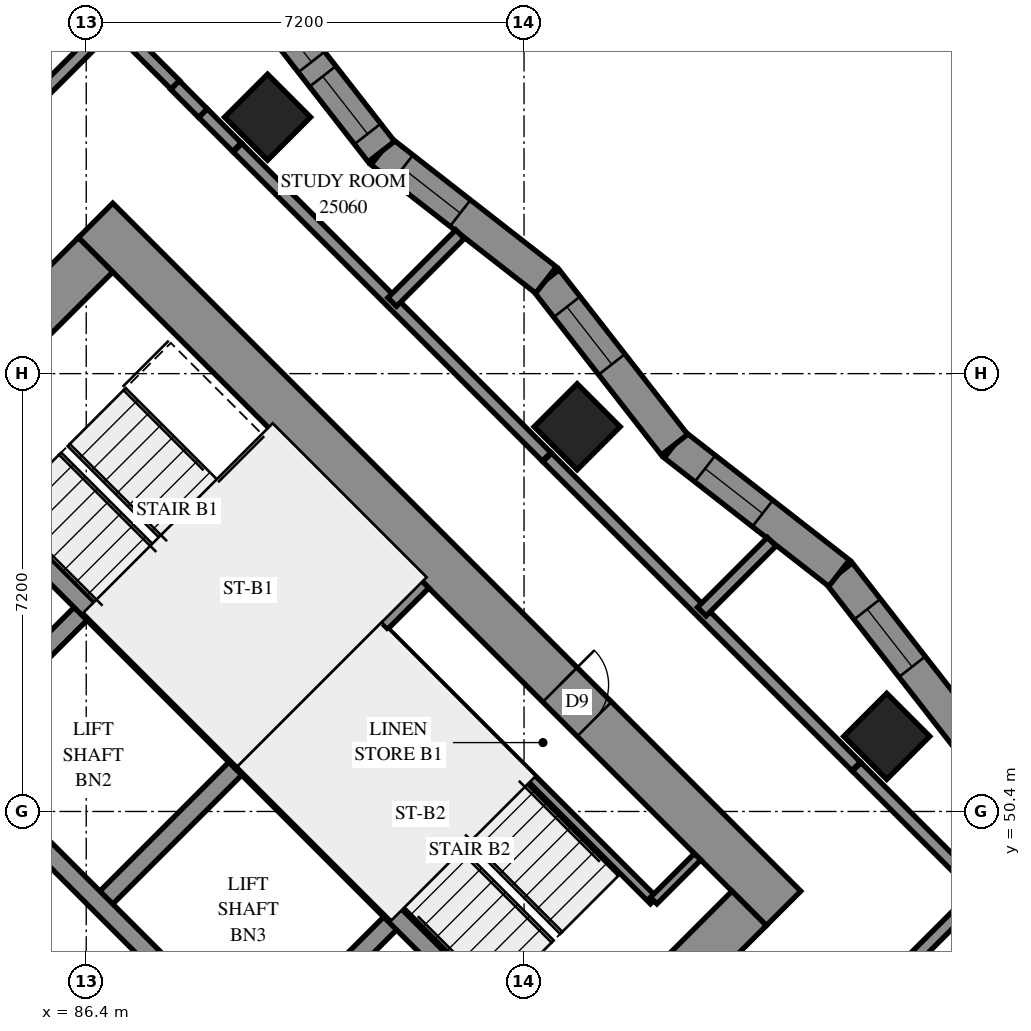
"""IFC4 building model, lengths in metres.
Left out: names, types, materials, properties, quantities, classifications, styles, units other than length and angle.
Written with IfcOpenShell. Run it as: python <this file> out.ifc"""

import sys

from ifc_helpers import new_model, si_unit, direction, frame, frame_2d, origin, origin_2d, place, context, subcontext, project, spatial, polyline, rectangle, outline, extrude, element, fill, save


model = new_model("IFC4")
c1 = context("Model", 3, precision=1e-05, world=origin(), true_north=direction((0.0, 1.0)))
c2 = subcontext(c1, "Body", "Model", "MODEL_VIEW")
j1 = project(units=[si_unit("LENGTHUNIT", "METRE"), si_unit("PLANEANGLEUNIT", "RADIAN")], contexts=[c1])
p1 = place(None, origin())
s1 = spatial("IfcSite", under=j1, at=p1, CompositionType="ELEMENT")
p2 = place(p1, origin())
s2 = spatial("IfcBuilding", under=s1, at=p2, CompositionType="ELEMENT")
p3 = place(p2, frame((0.0, 0.0, 94.8)))
s3 = spatial("IfcBuildingStorey", under=s2, at=p3, CompositionType="ELEMENT", Elevation=94.8)
for number, where, z_axis, x_axis in (
    (1, (89.382, 61.818, 0.0), (0.0, 0.0, 1.0), (0.707, -0.707, 0.0)),
    (2, (94.474, 56.727, 0.0), (0.0, 0.0, 1.0), (0.707, -0.707, 0.0)),
    (3, (99.565, 51.635, 0.0), (0.0, 0.0, 1.0), (0.707, -0.707, 0.0)),
):
    element("IfcColumn", number, at=place(p3, frame(where, z_axis=z_axis, x_axis=x_axis)), inside=s3, PredefinedType="COLUMN", context=c2, shape_type="SweptSolid", body=[
        extrude(rectangle(XDim=1.0, YDim=1.0, at=origin_2d()), origin(), (0.0, 0.0, 1.0), 3.1),
    ])
p4 = place(p3, frame((75.806, 49.373, -0.3), z_axis=(0.0, 0.0, 1.0), x_axis=(0.7071067812, -0.7071067812, 0.0)))
e4 = element("IfcWall", 4, at=p4, inside=s3, PredefinedType="SHEAR", context=c2, shape_type="SweptSolid", body=[
    extrude(rectangle(XDim=16.0, YDim=0.8, at=frame_2d((8.0, 0.0))), origin(), (0.0, 0.0, 1.0), 2.7),
])
p5 = place(p3, frame((86.554, 60.121, -0.3), z_axis=(0.0, 0.0, 1.0), x_axis=(0.7071067812, -0.7071067812, 0.0)))
e5 = element("IfcWall", 5, at=p5, inside=s3, PredefinedType="SHEAR", context=c2, shape_type="SweptSolid", body=[
    extrude(rectangle(XDim=16.0, YDim=0.8, at=frame_2d((8.0, 0.0))), origin(), (0.0, 0.0, 1.0), 2.7),
])
p6 = place(p5, frame((10.8, 0.0, 0.3)))
e6 = element("IfcOpeningElement", 6, at=p6, cuts=e5, PredefinedType="OPENING", context=c2, shape_type="SweptSolid", body=[
    extrude(rectangle(XDim=0.8, YDim=2.1, at=frame_2d((0.4, 1.05))), frame((0.0, 0.41, 0.0), z_axis=(0.0, -1.0, 0.0), x_axis=(1.0, 0.0, 0.0)), (0.0, 0.0, 1.0), 0.82),
])
p7 = place(p3, frame((76.372, 49.373, -0.3), z_axis=(0.0, 0.0, 1.0), x_axis=(0.7071067812, 0.7071067812, 0.0)))
e7 = element("IfcWall", 7, at=p7, inside=s3, PredefinedType="SHEAR", context=c2, shape_type="SweptSolid", body=[
    extrude(rectangle(XDim=14.4, YDim=0.8, at=frame_2d((7.2, 0.0))), origin(), (0.0, 0.0, 1.0), 2.7),
])
p8 = place(p7, frame((4.55, 0.0, 0.3)))
e8 = element("IfcOpeningElement", 8, at=p8, cuts=e7, PredefinedType="OPENING", context=c2, shape_type="SweptSolid", body=[
    extrude(rectangle(XDim=1.1, YDim=2.1, at=frame_2d((0.55, 1.05))), frame((0.0, 0.41, 0.0), z_axis=(0.0, -1.0, 0.0), x_axis=(1.0, 0.0, 0.0)), (0.0, 0.0, 1.0), 0.82),
])
p9 = place(p7, frame((11.35, 0.0, 0.3)))
e9 = element("IfcOpeningElement", 9, at=p9, cuts=e7, PredefinedType="OPENING", context=c2, shape_type="SweptSolid", body=[
    extrude(rectangle(XDim=1.1, YDim=2.1, at=frame_2d((0.55, 1.05))), frame((0.0, 0.41, 0.0), z_axis=(0.0, -1.0, 0.0), x_axis=(1.0, 0.0, 0.0)), (0.0, 0.0, 1.0), 0.82),
])
p10 = place(p3, frame((87.12, 38.625, -0.3), z_axis=(0.0, 0.0, 1.0), x_axis=(0.7071067812, 0.7071067812, 0.0)))
e10 = element("IfcWall", 10, at=p10, inside=s3, PredefinedType="SHEAR", context=c2, shape_type="SweptSolid", body=[
    extrude(rectangle(XDim=14.4, YDim=0.8, at=frame_2d((7.2, 0.0))), origin(), (0.0, 0.0, 1.0), 2.7),
])
p11 = place(p10, frame((4.55, 0.0, 0.3)))
e11 = element("IfcOpeningElement", 11, at=p11, cuts=e10, PredefinedType="OPENING", context=c2, shape_type="SweptSolid", body=[
    extrude(rectangle(XDim=1.1, YDim=2.1, at=frame_2d((0.55, 1.05))), frame((0.0, 0.41, 0.0), z_axis=(0.0, -1.0, 0.0), x_axis=(1.0, 0.0, 0.0)), (0.0, 0.0, 1.0), 0.82),
])
p12 = place(p10, frame((11.35, 0.0, 0.3)))
e12 = element("IfcOpeningElement", 12, at=p12, cuts=e10, PredefinedType="OPENING", context=c2, shape_type="SweptSolid", body=[
    extrude(rectangle(XDim=1.1, YDim=2.1, at=frame_2d((0.55, 1.05))), frame((0.0, 0.41, 0.0), z_axis=(0.0, -1.0, 0.0), x_axis=(1.0, 0.0, 0.0)), (0.0, 0.0, 1.0), 0.82),
])
p13 = place(p3, frame((84.079, 51.423, 0.0), z_axis=(0.0, 0.0, 1.0), x_axis=(0.7071219326, 0.7070916295, 0.0)))
e13 = element("IfcWall", 13, at=p13, inside=s3, PredefinedType="SOLIDWALL", context=c2, shape_type="SweptSolid", body=[
    extrude(rectangle(XDim=3.3, YDim=0.3, at=frame_2d((1.65, 0.0))), origin(), (0.0, 0.0, 1.0), 3.1),
])
for number, where, z_axis, x_axis in (
    (14, (86.625, 48.878, 0.0), (0.0, 0.0, 1.0), (0.707, 0.707, 0.0)),
    (15, (89.17, 46.332, 0.0), (0.0, 0.0, 1.0), (0.707, 0.707, 0.0)),
):
    element("IfcWall", number, at=place(p3, frame(where, z_axis=z_axis, x_axis=x_axis)), inside=s3, PredefinedType="SOLIDWALL", context=c2, shape_type="SweptSolid", body=[
        extrude(rectangle(XDim=3.3, YDim=0.3, at=frame_2d((1.65, 0.0))), origin(), (0.0, 0.0, 1.0), 3.1),
    ])
p14 = place(p3, frame((78.988, 51.423, 0.0), z_axis=(0.0, 0.0, 1.0), x_axis=(0.7071067812, -0.7071067812, 0.0)))
e16 = element("IfcWall", 16, at=p14, inside=s3, PredefinedType="SOLIDWALL", context=c2, shape_type="SweptSolid", body=[
    extrude(rectangle(XDim=14.4, YDim=0.3, at=frame_2d((7.2, 0.0))), origin(), (0.0, 0.0, 1.0), 3.1),
])
p15 = place(p14, frame((1.25, 0.0, 0.0)))
e17 = element("IfcOpeningElement", 17, at=p15, cuts=e16, PredefinedType="OPENING", context=c2, shape_type="SweptSolid", body=[
    extrude(rectangle(XDim=1.1, YDim=2.1, at=frame_2d((0.55, 1.05))), frame((0.0, 0.16, 0.0), z_axis=(0.0, -1.0, 0.0), x_axis=(1.0, 0.0, 0.0)), (0.0, 0.0, 1.0), 0.32),
])
p16 = place(p14, frame((4.85, 0.0, 0.0)))
e18 = element("IfcOpeningElement", 18, at=p16, cuts=e16, PredefinedType="OPENING", context=c2, shape_type="SweptSolid", body=[
    extrude(rectangle(XDim=1.1, YDim=2.1, at=frame_2d((0.55, 1.05))), frame((0.0, 0.16, 0.0), z_axis=(0.0, -1.0, 0.0), x_axis=(1.0, 0.0, 0.0)), (0.0, 0.0, 1.0), 0.32),
])
p17 = place(p14, frame((8.45, 0.0, 0.0)))
e19 = element("IfcOpeningElement", 19, at=p17, cuts=e16, PredefinedType="OPENING", context=c2, shape_type="SweptSolid", body=[
    extrude(rectangle(XDim=1.1, YDim=2.1, at=frame_2d((0.55, 1.05))), frame((0.0, 0.16, 0.0), z_axis=(0.0, -1.0, 0.0), x_axis=(1.0, 0.0, 0.0)), (0.0, 0.0, 1.0), 0.32),
])
p18 = place(p14, frame((12.05, 0.0, 0.0)))
e20 = element("IfcOpeningElement", 20, at=p18, cuts=e16, PredefinedType="OPENING", context=c2, shape_type="SweptSolid", body=[
    extrude(rectangle(XDim=1.1, YDim=2.1, at=frame_2d((0.55, 1.05))), frame((0.0, 0.16, 0.0), z_axis=(0.0, -1.0, 0.0), x_axis=(1.0, 0.0, 0.0)), (0.0, 0.0, 1.0), 0.32),
])
p19 = place(p3, frame((81.534, 53.969, 0.0), z_axis=(0.0, 0.0, 1.0), x_axis=(0.707103309, -0.7071102534, 0.0)))
e21 = element("IfcWall", 21, at=p19, inside=s3, PredefinedType="SOLIDWALL", context=c2, shape_type="SweptSolid", body=[
    extrude(rectangle(XDim=14.4, YDim=0.3, at=frame_2d((7.2, 0.0))), origin(), (0.0, 0.0, 1.0), 3.1),
])
p20 = place(p19, frame((12.05, 0.0, 0.0)))
e22 = element("IfcOpeningElement", 22, at=p20, cuts=e21, PredefinedType="OPENING", context=c2, shape_type="SweptSolid", body=[
    extrude(rectangle(XDim=1.1, YDim=2.1, at=frame_2d((0.55, 1.05))), frame((0.0, 0.16, 0.0), z_axis=(0.0, -1.0, 0.0), x_axis=(1.0, 0.0, 0.0)), (0.0, 0.0, 1.0), 0.32),
])
for number, where, z_axis, x_axis in (
    (23, (83.867, 56.302, 0.0), (0.0, 0.0, 1.0), (0.707, -0.707, 0.0)),
    (24, (88.958, 51.211, 0.0), (0.0, 0.0, 1.0), (0.707, -0.707, 0.0)),
):
    element("IfcWall", number, at=place(p3, frame(where, z_axis=z_axis, x_axis=x_axis)), inside=s3, PredefinedType="SOLIDWALL", context=c2, shape_type="SweptSolid", body=[
        extrude(rectangle(XDim=7.2, YDim=0.3, at=frame_2d((3.6, 0.0))), origin(), (0.0, 0.0, 1.0), 3.1),
    ])
p21 = place(p3, frame((88.958, 51.211, 0.0), z_axis=(0.0, 0.0, 1.0), x_axis=(0.7071067812, 0.7071067812, 0.0)))
e25 = element("IfcWall", 25, at=p21, inside=s3, PredefinedType="SOLIDWALL", context=c2, shape_type="SweptSolid", body=[
    extrude(rectangle(XDim=4.2, YDim=0.3, at=frame_2d((2.1, 0.0))), origin(), (0.0, 0.0, 1.0), 3.1),
])
p22 = place(p3, frame((100.894, 51.611, 0.0), z_axis=(0.0, 0.0, 1.0), x_axis=(-0.6150929849, 0.788454577, 0.0)))
e26 = element("IfcWall", 26, at=p22, inside=s3, PredefinedType="SOLIDWALL", context=c2, shape_type="SweptSolid", body=[
    extrude(outline(polyline([(0.034, -0.275), (3.468, -0.275), (3.401, 0.275), (-0.034, 0.275), (0.034, -0.275)])), origin(), (0.0, 0.0, 1.0), 3.1),
])
p23 = place(p22, frame((1.482, 0.0, 0.5)))
e27 = element("IfcOpeningElement", 27, at=p23, cuts=e26, PredefinedType="OPENING", context=c2, shape_type="SweptSolid", body=[
    extrude(rectangle(XDim=1.2, YDim=2.45, at=frame_2d((0.6, 1.225))), frame((0.0, 0.285, 0.0), z_axis=(0.0, -1.0, 0.0), x_axis=(1.0, 0.0, 0.0)), (0.0, 0.0, 1.0), 0.57),
])
p24 = place(p3, frame((98.782, 54.319, 0.0), z_axis=(0.0, 0.0, 1.0), x_axis=(-0.7884655926, 0.6150788643, 0.0)))
e28 = element("IfcWall", 28, at=p24, inside=s3, PredefinedType="SOLIDWALL", context=c2, shape_type="SweptSolid", body=[
    extrude(outline(polyline([(-0.034, -0.275), (3.401, -0.275), (3.468, 0.275), (0.034, 0.275), (-0.034, -0.275)])), origin(), (0.0, 0.0, 1.0), 3.1),
])
p25 = place(p24, frame((1.596, 0.0, 0.5)))
e29 = element("IfcOpeningElement", 29, at=p25, cuts=e28, PredefinedType="OPENING", context=c2, shape_type="SweptSolid", body=[
    extrude(rectangle(XDim=1.2, YDim=2.45, at=frame_2d((0.6, 1.225))), frame((0.0, 0.285, 0.0), z_axis=(0.0, -1.0, 0.0), x_axis=(1.0, 0.0, 0.0)), (0.0, 0.0, 1.0), 0.57),
])
p26 = place(p3, frame((96.074, 56.431, 0.0), z_axis=(0.0, 0.0, 1.0), x_axis=(-0.6150788643, 0.7884655926, 0.0)))
e30 = element("IfcWall", 30, at=p26, inside=s3, PredefinedType="SOLIDWALL", context=c2, shape_type="SweptSolid", body=[
    extrude(outline(polyline([(0.034, -0.275), (3.468, -0.275), (3.401, 0.275), (-0.034, 0.275), (0.034, -0.275)])), origin(), (0.0, 0.0, 1.0), 3.1),
])
p27 = place(p26, frame((1.675, 0.0, 0.5)))
e31 = element("IfcOpeningElement", 31, at=p27, cuts=e30, PredefinedType="OPENING", context=c2, shape_type="SweptSolid", body=[
    extrude(rectangle(XDim=1.2, YDim=2.45, at=frame_2d((0.6, 1.225))), frame((0.0, 0.285, 0.0), z_axis=(0.0, -1.0, 0.0), x_axis=(1.0, 0.0, 0.0)), (0.0, 0.0, 1.0), 0.57),
])
p28 = place(p3, frame((93.961, 59.139, 0.0), z_axis=(0.0, 0.0, 1.0), x_axis=(-0.788454577, 0.6150929849, 0.0)))
e32 = element("IfcWall", 32, at=p28, inside=s3, PredefinedType="SOLIDWALL", context=c2, shape_type="SweptSolid", body=[
    extrude(outline(polyline([(-0.034, -0.275), (3.401, -0.275), (3.468, 0.275), (0.034, 0.275), (-0.034, -0.275)])), origin(), (0.0, 0.0, 1.0), 3.1),
])
p29 = place(p28, frame((1.789, 0.0, 0.5)))
e33 = element("IfcOpeningElement", 33, at=p29, cuts=e32, PredefinedType="OPENING", context=c2, shape_type="SweptSolid", body=[
    extrude(rectangle(XDim=1.2, YDim=2.45, at=frame_2d((0.6, 1.225))), frame((0.0, 0.285, 0.0), z_axis=(0.0, -1.0, 0.0), x_axis=(1.0, 0.0, 0.0)), (0.0, 0.0, 1.0), 0.57),
])
p30 = place(p3, frame((91.253, 61.252, 0.0), z_axis=(0.0, 0.0, 1.0), x_axis=(-0.6150929849, 0.788454577, 0.0)))
e34 = element("IfcWall", 34, at=p30, inside=s3, PredefinedType="SOLIDWALL", context=c2, shape_type="SweptSolid", body=[
    extrude(outline(polyline([(0.034, -0.275), (3.468, -0.275), (3.401, 0.275), (-0.034, 0.275), (0.034, -0.275)])), origin(), (0.0, 0.0, 1.0), 3.1),
])
p31 = place(p30, frame((0.368, 0.0, 0.5)))
e35 = element("IfcOpeningElement", 35, at=p31, cuts=e34, PredefinedType="OPENING", context=c2, shape_type="SweptSolid", body=[
    extrude(rectangle(XDim=1.2, YDim=2.45, at=frame_2d((0.6, 1.225))), frame((0.0, 0.285, 0.0), z_axis=(0.0, -1.0, 0.0), x_axis=(1.0, 0.0, 0.0)), (0.0, 0.0, 1.0), 0.57),
])
p32 = place(p30, frame((1.868, 0.0, 0.5)))
e36 = element("IfcOpeningElement", 36, at=p32, cuts=e34, PredefinedType="OPENING", context=c2, shape_type="SweptSolid", body=[
    extrude(rectangle(XDim=1.2, YDim=2.45, at=frame_2d((0.6, 1.225))), frame((0.0, 0.285, 0.0), z_axis=(0.0, -1.0, 0.0), x_axis=(1.0, 0.0, 0.0)), (0.0, 0.0, 1.0), 0.57),
])
p33 = place(p3, frame((91.313, 53.354, 0.0), z_axis=(0.0, 0.0, 1.0), x_axis=(0.7071147811, -0.7070987812, 0.0)))
e37 = element("IfcWall", 37, at=p33, inside=s3, PredefinedType="PARTITIONING", context=c2, shape_type="SweptSolid", body=[
    extrude(rectangle(XDim=6.25, YDim=0.15, at=frame_2d((3.125, 0.0))), origin(), (0.0, 0.0, 1.0), 3.1),
])
p34 = place(p3, frame((95.732, 48.934, 0.0), z_axis=(0.0, 0.0, 1.0), x_axis=(0.7071067812, 0.7071067812, 0.0)))
e38 = element("IfcWall", 38, at=p34, inside=s3, PredefinedType="PARTITIONING", context=c2, shape_type="SweptSolid", body=[
    extrude(rectangle(XDim=1.02, YDim=0.15, at=frame_2d((0.51, 0.0))), origin(), (0.0, 0.0, 1.0), 3.1),
])
p35 = place(p3, frame((94.615, 42.587, 0.0), z_axis=(0.0, 0.0, 1.0), x_axis=(0.7071067812, 0.7071067812, 0.0)))
e39 = element("IfcWall", 39, at=p35, inside=s3, PredefinedType="PARTITIONING", context=c2, shape_type="SweptSolid", body=[
    extrude(rectangle(XDim=9.198, YDim=0.2, at=frame_2d((4.599, 0.0))), origin(), (0.0, 0.0, 1.0), 3.1),
])
p36 = place(p35, frame((0.248, 0.0, 0.0)))
e40 = element("IfcOpeningElement", 40, at=p36, cuts=e39, PredefinedType="OPENING", context=c2, shape_type="SweptSolid", body=[
    extrude(rectangle(XDim=1.0, YDim=2.1, at=frame_2d((0.5, 1.05))), frame((0.0, 0.11, 0.0), z_axis=(0.0, -1.0, 0.0), x_axis=(1.0, 0.0, 0.0)), (0.0, 0.0, 1.0), 0.22),
])
p37 = place(p3, frame((80.949, 58.477, 0.0), z_axis=(0.0, 0.0, 1.0), x_axis=(0.7071122423, 0.7071013201, 0.0)))
e41 = element("IfcWall", 41, at=p37, inside=s3, PredefinedType="PARTITIONING", context=c2, shape_type="SweptSolid", body=[
    extrude(rectangle(XDim=9.156, YDim=0.2, at=frame_2d((4.578, 0.0))), origin(), (0.0, 0.0, 1.0), 3.1),
])
p38 = place(p3, frame((96.805, 43.787, 0.0), z_axis=(0.0, 0.0, 1.0), x_axis=(0.7071126822, 0.7071008801, 0.0)))
e42 = element("IfcWall", 42, at=p38, inside=s3, PredefinedType="PARTITIONING", context=c2, shape_type="SweptSolid", body=[
    extrude(rectangle(XDim=8.473, YDim=0.2, at=frame_2d((4.237, 0.0))), origin(), (0.0, 0.0, 1.0), 3.1),
])
p39 = place(p3, frame((80.951, 57.489, 0.0), z_axis=(0.0, 0.0, 1.0), x_axis=(0.7071067812, 0.7071067812, 0.0)))
e43 = element("IfcWall", 43, at=p39, inside=s3, PredefinedType="PARTITIONING", context=c2, shape_type="SweptSolid", body=[
    extrude(rectangle(XDim=8.321, YDim=0.2, at=frame_2d((4.161, 0.0))), origin(), (0.0, 0.0, 1.0), 3.1),
])
p40 = place(p39, frame((0.851, 0.0, 0.0)))
e44 = element("IfcOpeningElement", 44, at=p40, cuts=e43, PredefinedType="OPENING", context=c2, shape_type="SweptSolid", body=[
    extrude(rectangle(XDim=1.0, YDim=2.1, at=frame_2d((0.5, 1.05))), frame((0.0, 0.11, 0.0), z_axis=(0.0, -1.0, 0.0), x_axis=(1.0, 0.0, 0.0)), (0.0, 0.0, 1.0), 0.22),
])
p41 = place(p3, frame((88.889, 61.315, 0.0), z_axis=(0.0, 0.0, 1.0), x_axis=(0.7071067812, -0.7071067812, 0.0)))
e45 = element("IfcWall", 45, at=p41, inside=s3, PredefinedType="PARTITIONING", context=c2, shape_type="SweptSolid", body=[
    extrude(rectangle(XDim=7.187, YDim=0.2, at=frame_2d((3.594, 0.0))), origin(), (0.0, 0.0, 1.0), 3.1),
])
p42 = place(p3, frame((93.981, 56.223, 0.0), z_axis=(0.0, 0.0, 1.0), x_axis=(0.7071067812, -0.7071067812, 0.0)))
e46 = element("IfcWall", 46, at=p42, inside=s3, PredefinedType="PARTITIONING", context=c2, shape_type="SweptSolid", body=[
    extrude(rectangle(XDim=7.184, YDim=0.2, at=frame_2d((3.592, 0.0))), origin(), (0.0, 0.0, 1.0), 3.1),
])
p43 = place(p3, frame((99.071, 51.133, 0.0), z_axis=(0.0, 0.0, 1.0), x_axis=(0.7071067812, -0.7071067812, 0.0)))
e47 = element("IfcWall", 47, at=p43, inside=s3, PredefinedType="PARTITIONING", context=c2, shape_type="SweptSolid", body=[
    extrude(rectangle(XDim=2.893, YDim=0.2, at=frame_2d((1.447, 0.0))), origin(), (0.0, 0.0, 1.0), 3.1),
])
p44 = place(p3, frame((96.523, 53.687, 0.0), z_axis=(0.0, 0.0, 1.0), x_axis=(0.7070760086, 0.7071375524, 0.0)))
e48 = element("IfcWall", 48, at=p44, inside=s3, PredefinedType="PARTITIONING", context=c2, shape_type="SweptSolid", body=[
    extrude(rectangle(XDim=1.625, YDim=0.2, at=frame_2d((0.812, 0.0))), origin(), (0.0, 0.0, 1.0), 3.1),
])
p45 = place(p3, frame((91.432, 58.778, 0.0), z_axis=(0.0, 0.0, 1.0), x_axis=(0.7071067812, 0.7071067812, 0.0)))
e49 = element("IfcWall", 49, at=p45, inside=s3, PredefinedType="PARTITIONING", context=c2, shape_type="SweptSolid", body=[
    extrude(rectangle(XDim=1.578, YDim=0.2, at=frame_2d((0.789, 0.0))), origin(), (0.0, 0.0, 1.0), 3.1),
])
p46 = place(p3, frame((86.839, 63.373, 0.0), z_axis=(0.0, 0.0, 1.0), x_axis=(0.7077963046, -0.7064165847, 0.0)))
e50 = element("IfcWall", 50, at=p46, inside=s3, PredefinedType="PARTITIONING", context=c2, shape_type="SweptSolid", body=[
    extrude(rectangle(XDim=1.45, YDim=0.2, at=frame_2d((0.725, 0.0))), origin(), (0.0, 0.0, 1.0), 3.1),
])
p47 = place(p3, frame((88.319, 61.885, 0.0), z_axis=(0.0, 0.0, 1.0), x_axis=(0.7071067812, -0.7071067812, 0.0)))
e51 = element("IfcWall", 51, at=p47, inside=s3, PredefinedType="PARTITIONING", context=c2, shape_type="SweptSolid", body=[
    extrude(rectangle(XDim=0.792, YDim=0.2, at=frame_2d((0.396, 0.0))), origin(), (0.0, 0.0, 1.0), 3.1),
])
p48 = place(p3, frame((87.861, 62.344, 0.0), z_axis=(0.0, 0.0, 1.0), x_axis=(0.7055645691, -0.708645637, 0.0)))
e52 = element("IfcWall", 52, at=p48, inside=s3, PredefinedType="PARTITIONING", context=c2, shape_type="SweptSolid", body=[
    extrude(rectangle(XDim=0.649, YDim=0.2, at=frame_2d((0.325, 0.0))), origin(), (0.0, 0.0, 1.0), 3.1),
])
p49 = place(p23, origin())
e53 = element("IfcWindow", 53, at=p49, inside=s3, PartitioningType="SINGLE_PANEL", PredefinedType="WINDOW", context=c2, shape_type="SweptSolid", body=[
    extrude(rectangle(XDim=1.2, YDim=2.45, at=frame_2d((0.6, 1.225))), frame((0.0, 0.155, 0.0), z_axis=(0.0, -1.0, 0.0), x_axis=(1.0, 0.0, 0.0)), (0.0, 0.0, 1.0), 0.06),
])
fill(e27, e53)
p50 = place(p25, origin())
e54 = element("IfcWindow", 54, at=p50, inside=s3, PartitioningType="SINGLE_PANEL", PredefinedType="WINDOW", context=c2, shape_type="SweptSolid", body=[
    extrude(rectangle(XDim=1.2, YDim=2.45, at=frame_2d((0.6, 1.225))), frame((0.0, 0.155, 0.0), z_axis=(0.0, -1.0, 0.0), x_axis=(1.0, 0.0, 0.0)), (0.0, 0.0, 1.0), 0.06),
])
fill(e29, e54)
p51 = place(p27, origin())
e55 = element("IfcWindow", 55, at=p51, inside=s3, PartitioningType="SINGLE_PANEL", PredefinedType="WINDOW", context=c2, shape_type="SweptSolid", body=[
    extrude(rectangle(XDim=1.2, YDim=2.45, at=frame_2d((0.6, 1.225))), frame((0.0, 0.155, 0.0), z_axis=(0.0, -1.0, 0.0), x_axis=(1.0, 0.0, 0.0)), (0.0, 0.0, 1.0), 0.06),
])
fill(e31, e55)
p52 = place(p29, origin())
e56 = element("IfcWindow", 56, at=p52, inside=s3, PartitioningType="SINGLE_PANEL", PredefinedType="WINDOW", context=c2, shape_type="SweptSolid", body=[
    extrude(rectangle(XDim=1.2, YDim=2.45, at=frame_2d((0.6, 1.225))), frame((0.0, 0.155, 0.0), z_axis=(0.0, -1.0, 0.0), x_axis=(1.0, 0.0, 0.0)), (0.0, 0.0, 1.0), 0.06),
])
fill(e33, e56)
p53 = place(p31, origin())
e57 = element("IfcWindow", 57, at=p53, inside=s3, PartitioningType="SINGLE_PANEL", PredefinedType="WINDOW", context=c2, shape_type="SweptSolid", body=[
    extrude(rectangle(XDim=1.2, YDim=2.45, at=frame_2d((0.6, 1.225))), frame((0.0, 0.155, 0.0), z_axis=(0.0, -1.0, 0.0), x_axis=(1.0, 0.0, 0.0)), (0.0, 0.0, 1.0), 0.06),
])
fill(e35, e57)
p54 = place(p32, origin())
e58 = element("IfcWindow", 58, at=p54, inside=s3, PartitioningType="SINGLE_PANEL", PredefinedType="WINDOW", context=c2, shape_type="SweptSolid", body=[
    extrude(rectangle(XDim=1.2, YDim=2.45, at=frame_2d((0.6, 1.225))), frame((0.0, 0.155, 0.0), z_axis=(0.0, -1.0, 0.0), x_axis=(1.0, 0.0, 0.0)), (0.0, 0.0, 1.0), 0.06),
])
fill(e36, e58)
p55 = place(p6, origin())
e59 = element("IfcDoor", 59, at=p55, inside=s3, OperationType="SINGLE_SWING_RIGHT", PredefinedType="DOOR", context=c2, shape_type="SweptSolid", body=[
    extrude(rectangle(XDim=0.8, YDim=2.1, at=frame_2d((0.4, 1.05))), frame((0.0, -0.34, 0.0), z_axis=(0.0, -1.0, 0.0), x_axis=(1.0, 0.0, 0.0)), (0.0, 0.0, 1.0), 0.05),
])
fill(e6, e59)
save(model, sys.argv[1])
